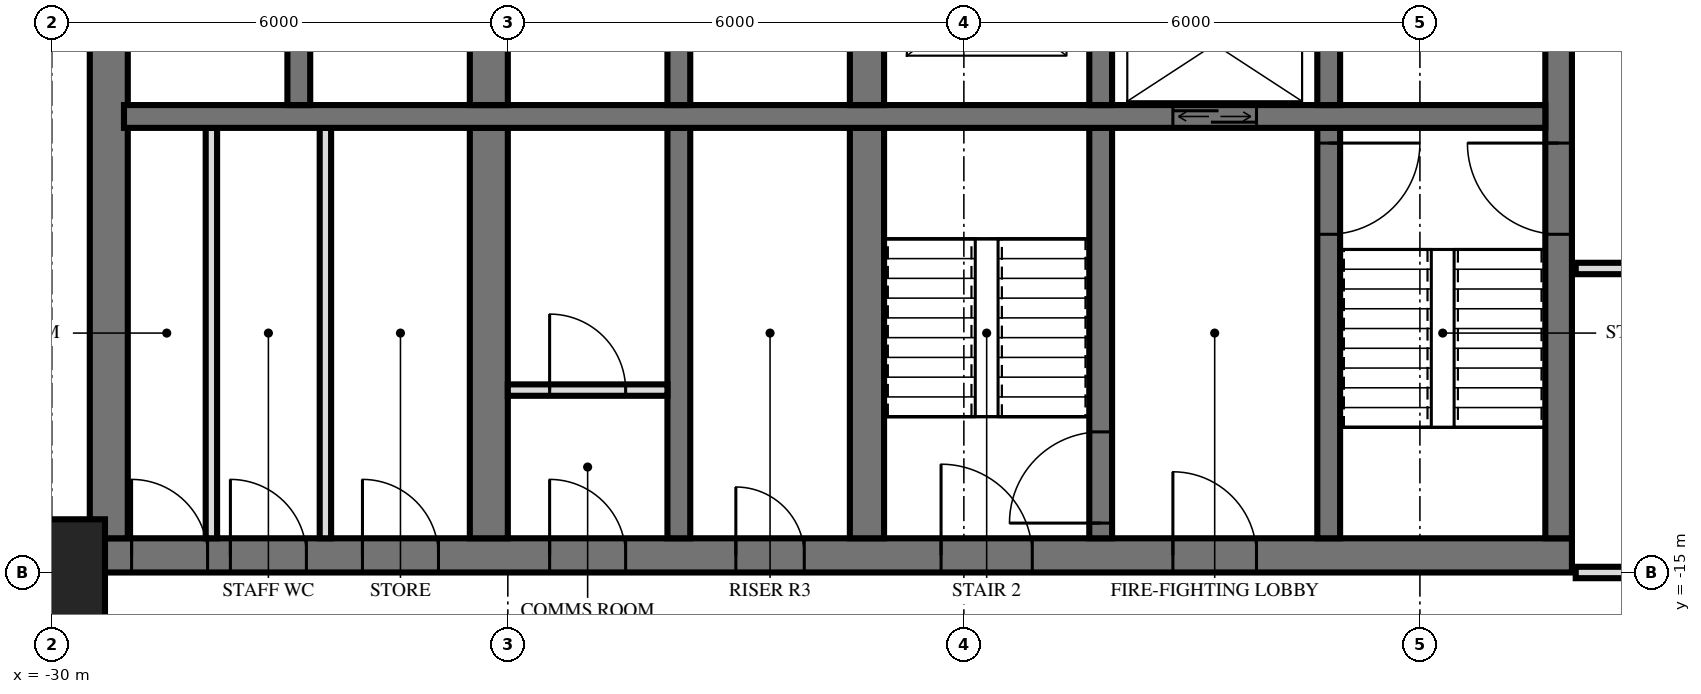
"""IFC4 building model, lengths in metres.
Left out: names, types, materials, properties, quantities, classifications, styles, units other than length and angle.
Written with IfcOpenShell. Run it as: python <this file> out.ifc"""

import sys

from ifc_helpers import new_model, si_unit, direction, frame, frame_2d, origin, origin_2d, place, context, subcontext, project, spatial, rectangle, extrude, element, fill, save


model = new_model("IFC4")
c1 = context("Model", 3, precision=1e-05, world=origin(), true_north=direction((0.0, 1.0)))
c2 = subcontext(c1, "Body", "Model", "MODEL_VIEW")
j1 = project(units=[si_unit("LENGTHUNIT", "METRE"), si_unit("PLANEANGLEUNIT", "RADIAN")], contexts=[c1])
p1 = place(None, origin())
s1 = spatial("IfcSite", under=j1, at=p1, CompositionType="ELEMENT")
p2 = place(p1, origin())
s2 = spatial("IfcBuilding", under=s1, at=p2, CompositionType="ELEMENT")
p3 = place(p2, frame((0.0, 0.0, 45.6)))
s3 = spatial("IfcBuildingStorey", under=s2, at=p3, CompositionType="ELEMENT", Elevation=45.6)
p4 = place(p3, frame((-30.0, -15.0, 0.0), z_axis=(0.0, 0.0, 1.0), x_axis=(1.0, 0.0, 0.0)))
e1 = element("IfcColumn", 1, at=p4, inside=s3, PredefinedType="COLUMN", context=c2, shape_type="SweptSolid", body=[
    extrude(rectangle(XDim=1.4, YDim=1.4, at=origin_2d()), origin(), (0.0, 0.0, 1.0), 3.6),
])
p5 = place(p3, frame((-29.5, -14.775, 0.0), z_axis=(0.0, 0.0, 1.0), x_axis=(1.0, 0.0, 0.0)))
e2 = element("IfcWall", 2, at=p5, inside=s3, PredefinedType="SHEAR", context=c2, shape_type="SweptSolid", body=[
    extrude(rectangle(XDim=19.5, YDim=0.45, at=frame_2d((9.75, 0.0))), origin(), (0.0, 0.0, 1.0), 3.6),
])
p6 = place(p5, frame((11.2, 0.0, 0.0)))
e3 = element("IfcOpeningElement", 3, at=p6, cuts=e2, PredefinedType="OPENING", context=c2, shape_type="SweptSolid", body=[
    extrude(rectangle(XDim=1.2, YDim=2.1, at=frame_2d((0.6, 1.05))), frame((0.0, 0.235, 0.0), z_axis=(0.0, -1.0, 0.0), x_axis=(1.0, 0.0, 0.0)), (0.0, 0.0, 1.0), 0.47),
])
p7 = place(p5, frame((14.25, 0.0, 0.0)))
e4 = element("IfcOpeningElement", 4, at=p7, cuts=e2, PredefinedType="OPENING", context=c2, shape_type="SweptSolid", body=[
    extrude(rectangle(XDim=1.1, YDim=2.1, at=frame_2d((0.55, 1.05))), frame((0.0, 0.235, 0.0), z_axis=(0.0, -1.0, 0.0), x_axis=(1.0, 0.0, 0.0)), (0.0, 0.0, 1.0), 0.47),
])
p8 = place(p5, frame((8.5, 0.0, 0.0)))
e5 = element("IfcOpeningElement", 5, at=p8, cuts=e2, PredefinedType="OPENING", context=c2, shape_type="SweptSolid", body=[
    extrude(rectangle(XDim=0.9, YDim=2.1, at=frame_2d((0.45, 1.05))), frame((0.0, 0.235, 0.0), z_axis=(0.0, -1.0, 0.0), x_axis=(1.0, 0.0, 0.0)), (0.0, 0.0, 1.0), 0.47),
])
p9 = place(p5, frame((6.05, 0.0, 0.0)))
e6 = element("IfcOpeningElement", 6, at=p9, cuts=e2, PredefinedType="OPENING", context=c2, shape_type="SweptSolid", body=[
    extrude(rectangle(XDim=1.0, YDim=2.1, at=frame_2d((0.5, 1.05))), frame((0.0, 0.235, 0.0), z_axis=(0.0, -1.0, 0.0), x_axis=(1.0, 0.0, 0.0)), (0.0, 0.0, 1.0), 0.47),
])
p10 = place(p5, frame((3.587, 0.0, 0.0)))
e7 = element("IfcOpeningElement", 7, at=p10, cuts=e2, PredefinedType="OPENING", context=c2, shape_type="SweptSolid", body=[
    extrude(rectangle(XDim=1.0, YDim=2.1, at=frame_2d((0.5, 1.05))), frame((0.0, 0.235, 0.0), z_axis=(0.0, -1.0, 0.0), x_axis=(1.0, 0.0, 0.0)), (0.0, 0.0, 1.0), 0.47),
])
p11 = place(p5, frame((1.85, 0.0, 0.0)))
e8 = element("IfcOpeningElement", 8, at=p11, cuts=e2, PredefinedType="OPENING", context=c2, shape_type="SweptSolid", body=[
    extrude(rectangle(XDim=1.0, YDim=2.1, at=frame_2d((0.5, 1.05))), frame((0.0, 0.235, 0.0), z_axis=(0.0, -1.0, 0.0), x_axis=(1.0, 0.0, 0.0)), (0.0, 0.0, 1.0), 0.47),
])
p12 = place(p5, frame((0.55, 0.0, 0.0)))
e9 = element("IfcOpeningElement", 9, at=p12, cuts=e2, PredefinedType="OPENING", context=c2, shape_type="SweptSolid", body=[
    extrude(rectangle(XDim=1.0, YDim=2.1, at=frame_2d((0.5, 1.05))), frame((0.0, 0.235, 0.0), z_axis=(0.0, -1.0, 0.0), x_axis=(1.0, 0.0, 0.0)), (0.0, 0.0, 1.0), 0.47),
])
p13 = place(p3, frame((-10.175, -14.55, 0.0), z_axis=(0.0, 0.0, 1.0), x_axis=(0.0, 1.0, 0.0)))
e10 = element("IfcWall", 10, at=p13, inside=s3, PredefinedType="SHEAR", context=c2, shape_type="SweptSolid", body=[
    extrude(rectangle(XDim=14.1, YDim=0.35, at=frame_2d((7.05, 0.0))), origin(), (0.0, 0.0, 1.0), 3.6),
])
p14 = place(p13, frame((8.4, 0.0, 0.0)))
e11 = element("IfcOpeningElement", 11, at=p14, cuts=e10, PredefinedType="OPENING", context=c2, shape_type="SweptSolid", body=[
    extrude(rectangle(XDim=1.4, YDim=2.4, at=frame_2d((0.7, 1.2))), frame((0.0, 0.185, 0.0), z_axis=(0.0, -1.0, 0.0), x_axis=(1.0, 0.0, 0.0)), (0.0, 0.0, 1.0), 0.37),
])
p15 = place(p13, frame((10.0, 0.0, 0.0)))
e12 = element("IfcOpeningElement", 12, at=p15, cuts=e10, PredefinedType="OPENING", context=c2, shape_type="SweptSolid", body=[
    extrude(rectangle(XDim=1.4, YDim=2.4, at=frame_2d((0.7, 1.2))), frame((0.0, 0.185, 0.0), z_axis=(0.0, -1.0, 0.0), x_axis=(1.0, 0.0, 0.0)), (0.0, 0.0, 1.0), 0.37),
])
p16 = place(p13, frame((4.0, 0.0, 0.0)))
e13 = element("IfcOpeningElement", 13, at=p16, cuts=e10, PredefinedType="OPENING", context=c2, shape_type="SweptSolid", body=[
    extrude(rectangle(XDim=1.2, YDim=2.1, at=frame_2d((0.6, 1.05))), frame((0.0, 0.185, 0.0), z_axis=(0.0, -1.0, 0.0), x_axis=(1.0, 0.0, 0.0)), (0.0, 0.0, 1.0), 0.37),
])
p17 = place(p3, frame((-29.25, -14.55, 0.0), z_axis=(0.0, 0.0, 1.0), x_axis=(0.0, 1.0, 0.0)))
e14 = element("IfcWall", 14, at=p17, inside=s3, PredefinedType="SHEAR", context=c2, shape_type="SweptSolid", body=[
    extrude(rectangle(XDim=14.1, YDim=0.5, at=frame_2d((7.05, 0.0))), origin(), (0.0, 0.0, 1.0), 3.6),
])
p18 = place(p3, frame((-29.05, -9.0, 0.0), z_axis=(0.0, 0.0, 1.0), x_axis=(1.0, 0.0, 0.0)))
e15 = element("IfcWall", 15, at=p18, inside=s3, PredefinedType="SHEAR", context=c2, shape_type="SweptSolid", body=[
    extrude(rectangle(XDim=18.7, YDim=0.3, at=frame_2d((9.35, 0.0))), origin(), (0.0, 0.0, 1.0), 3.6),
])
p19 = place(p18, frame((13.8, 0.0, 0.0)))
e16 = element("IfcOpeningElement", 16, at=p19, cuts=e15, PredefinedType="OPENING", context=c2, shape_type="SweptSolid", body=[
    extrude(rectangle(XDim=1.1, YDim=2.1, at=frame_2d((0.55, 1.05))), frame((0.0, 0.16, 0.0), z_axis=(0.0, -1.0, 0.0), x_axis=(1.0, 0.0, 0.0)), (0.0, 0.0, 1.0), 0.32),
])
p20 = place(p3, frame((-13.2, -8.85, 0.0), z_axis=(0.0, 0.0, 1.0), x_axis=(0.0, 1.0, 0.0)))
e17 = element("IfcWall", 17, at=p20, inside=s3, PredefinedType="SHEAR", context=c2, shape_type="SweptSolid", body=[
    extrude(rectangle(XDim=2.3, YDim=0.3, at=frame_2d((1.15, 0.0))), origin(), (0.0, 0.0, 1.0), 3.6),
])
p21 = place(p3, frame((-13.2, -14.55, 0.0), z_axis=(0.0, 0.0, 1.0), x_axis=(0.0, 1.0, 0.0)))
e18 = element("IfcWall", 18, at=p21, inside=s3, PredefinedType="SHEAR", context=c2, shape_type="SweptSolid", body=[
    extrude(rectangle(XDim=5.4, YDim=0.3, at=frame_2d((2.7, 0.0))), origin(), (0.0, 0.0, 1.0), 3.6),
])
p22 = place(p21, frame((4.0, 0.0, 0.0)))
e19 = element("IfcOpeningElement", 19, at=p22, cuts=e18, PredefinedType="OPENING", context=c2, shape_type="SweptSolid", body=[
    extrude(rectangle(XDim=1.2, YDim=2.1, at=frame_2d((0.6, 1.05))), frame((0.0, 0.16, 0.0), z_axis=(0.0, -1.0, 0.0), x_axis=(1.0, 0.0, 0.0)), (0.0, 0.0, 1.0), 0.32),
])
p23 = place(p3, frame((-16.2, -8.85, 0.0), z_axis=(0.0, 0.0, 1.0), x_axis=(0.0, 1.0, 0.0)))
e20 = element("IfcWall", 20, at=p23, inside=s3, PredefinedType="SHEAR", context=c2, shape_type="SweptSolid", body=[
    extrude(rectangle(XDim=2.3, YDim=0.3, at=frame_2d((1.15, 0.0))), origin(), (0.0, 0.0, 1.0), 3.6),
])
p24 = place(p3, frame((-16.2, -14.55, 0.0), z_axis=(0.0, 0.0, 1.0), x_axis=(0.0, 1.0, 0.0)))
e21 = element("IfcWall", 21, at=p24, inside=s3, PredefinedType="SHEAR", context=c2, shape_type="SweptSolid", body=[
    extrude(rectangle(XDim=5.4, YDim=0.3, at=frame_2d((2.7, 0.0))), origin(), (0.0, 0.0, 1.0), 3.6),
])
p25 = place(p24, frame((0.2, 0.0, 0.0)))
e22 = element("IfcOpeningElement", 22, at=p25, cuts=e21, PredefinedType="OPENING", context=c2, shape_type="SweptSolid", body=[
    extrude(rectangle(XDim=1.2, YDim=2.1, at=frame_2d((0.6, 1.05))), frame((0.0, 0.16, 0.0), z_axis=(0.0, -1.0, 0.0), x_axis=(1.0, 0.0, 0.0)), (0.0, 0.0, 1.0), 0.32),
])
p26 = place(p3, frame((-19.275, -8.85, 0.0), z_axis=(0.0, 0.0, 1.0), x_axis=(0.0, 1.0, 0.0)))
e23 = element("IfcWall", 23, at=p26, inside=s3, PredefinedType="SHEAR", context=c2, shape_type="SweptSolid", body=[
    extrude(rectangle(XDim=2.3, YDim=0.45, at=frame_2d((1.15, 0.0))), origin(), (0.0, 0.0, 1.0), 3.6),
])
p27 = place(p3, frame((-19.275, -14.55, 0.0), z_axis=(0.0, 0.0, 1.0), x_axis=(0.0, 1.0, 0.0)))
e24 = element("IfcWall", 24, at=p27, inside=s3, PredefinedType="SHEAR", context=c2, shape_type="SweptSolid", body=[
    extrude(rectangle(XDim=5.4, YDim=0.45, at=frame_2d((2.7, 0.0))), origin(), (0.0, 0.0, 1.0), 3.6),
])
p28 = place(p3, frame((-21.75, -8.85, 0.0), z_axis=(0.0, 0.0, 1.0), x_axis=(0.0, 1.0, 0.0)))
e25 = element("IfcWall", 25, at=p28, inside=s3, PredefinedType="SHEAR", context=c2, shape_type="SweptSolid", body=[
    extrude(rectangle(XDim=2.3, YDim=0.3, at=frame_2d((1.15, 0.0))), origin(), (0.0, 0.0, 1.0), 3.6),
])
p29 = place(p3, frame((-21.75, -14.55, 0.0), z_axis=(0.0, 0.0, 1.0), x_axis=(0.0, 1.0, 0.0)))
e26 = element("IfcWall", 26, at=p29, inside=s3, PredefinedType="SHEAR", context=c2, shape_type="SweptSolid", body=[
    extrude(rectangle(XDim=5.4, YDim=0.3, at=frame_2d((2.7, 0.0))), origin(), (0.0, 0.0, 1.0), 3.6),
])
p30 = place(p3, frame((-24.25, -8.85, 0.0), z_axis=(0.0, 0.0, 1.0), x_axis=(0.0, 1.0, 0.0)))
e27 = element("IfcWall", 27, at=p30, inside=s3, PredefinedType="SHEAR", context=c2, shape_type="SweptSolid", body=[
    extrude(rectangle(XDim=2.3, YDim=0.5, at=frame_2d((1.15, 0.0))), origin(), (0.0, 0.0, 1.0), 3.6),
])
p31 = place(p3, frame((-24.25, -14.55, 0.0), z_axis=(0.0, 0.0, 1.0), x_axis=(0.0, 1.0, 0.0)))
e28 = element("IfcWall", 28, at=p31, inside=s3, PredefinedType="SHEAR", context=c2, shape_type="SweptSolid", body=[
    extrude(rectangle(XDim=5.4, YDim=0.5, at=frame_2d((2.7, 0.0))), origin(), (0.0, 0.0, 1.0), 3.6),
])
p32 = place(p3, frame((-26.75, -8.85, 0.0), z_axis=(0.0, 0.0, 1.0), x_axis=(0.0, 1.0, 0.0)))
e29 = element("IfcWall", 29, at=p32, inside=s3, PredefinedType="SHEAR", context=c2, shape_type="SweptSolid", body=[
    extrude(rectangle(XDim=2.3, YDim=0.3, at=frame_2d((1.15, 0.0))), origin(), (0.0, 0.0, 1.0), 3.6),
])
p33 = place(p3, frame((-24.0, -12.6, 0.0), z_axis=(0.0, 0.0, 1.0), x_axis=(1.0, 0.0, 0.0)))
e30 = element("IfcWall", 30, at=p33, inside=s3, PredefinedType="PARTITIONING", context=c2, shape_type="SweptSolid", body=[
    extrude(rectangle(XDim=2.1, YDim=0.15, at=frame_2d((1.05, 0.0))), origin(), (0.0, 0.0, 1.0), 3.3),
])
p34 = place(p33, frame((0.55, 0.0, 0.0)))
e31 = element("IfcOpeningElement", 31, at=p34, cuts=e30, PredefinedType="OPENING", context=c2, shape_type="SweptSolid", body=[
    extrude(rectangle(XDim=1.0, YDim=2.1, at=frame_2d((0.5, 1.05))), frame((0.0, 0.085, 0.0), z_axis=(0.0, -1.0, 0.0), x_axis=(1.0, 0.0, 0.0)), (0.0, 0.0, 1.0), 0.17),
])
for number, where, z_axis, x_axis in (
    (32, (-26.4, -14.55, 0.0), (0.0, 0.0, 1.0), (0.0, 1.0, 0.0)),
    (33, (-27.9, -14.55, 0.0), (0.0, 0.0, 1.0), (0.0, 1.0, 0.0)),
):
    element("IfcWall", number, at=place(p3, frame(where, z_axis=z_axis, x_axis=x_axis)), inside=s3, PredefinedType="PARTITIONING", context=c2, shape_type="SweptSolid", body=[
        extrude(rectangle(XDim=5.4, YDim=0.15, at=frame_2d((2.7, 0.0))), origin(), (0.0, 0.0, 1.0), 3.3),
    ])
p35 = place(p3, frame((-33.12, -15.0, 0.0), z_axis=(0.0, 0.0, 1.0), x_axis=(1.0, 0.0, 0.0)))
e34 = element("IfcWall", 34, at=p35, inside=s3, PredefinedType="PARTITIONING", context=c2, shape_type="SweptSolid", body=[
    extrude(rectangle(XDim=3.57, YDim=0.15, at=frame_2d((1.785, 0.0))), origin(), (0.0, 0.0, 1.0), 3.32),
])
p36 = place(p35, frame((1.58, 0.0, 0.0)))
e35 = element("IfcOpeningElement", 35, at=p36, cuts=e34, PredefinedType="OPENING", context=c2, shape_type="SweptSolid", body=[
    extrude(rectangle(XDim=0.8, YDim=2.1, at=frame_2d((0.4, 1.05))), frame((0.0, 0.085, 0.0), z_axis=(0.0, -1.0, 0.0), x_axis=(1.0, 0.0, 0.0)), (0.0, 0.0, 1.0), 0.17),
])
p37 = place(p3, frame((-9.95, -15.0, 0.0), z_axis=(0.0, 0.0, 1.0), x_axis=(1.0, 0.0, 0.0)))
e36 = element("IfcWall", 36, at=p37, inside=s3, PredefinedType="PARTITIONING", context=c2, shape_type="SweptSolid", body=[
    extrude(rectangle(XDim=19.9, YDim=0.15, at=frame_2d((9.95, 0.0))), origin(), (0.0, 0.0, 1.0), 2.684),
])
p38 = place(p37, frame((9.45, 0.0, 0.0)))
e37 = element("IfcOpeningElement", 37, at=p38, cuts=e36, PredefinedType="OPENING", context=c2, shape_type="SweptSolid", body=[
    extrude(rectangle(XDim=1.0, YDim=2.1, at=frame_2d((0.5, 1.05))), frame((0.0, 0.085, 0.0), z_axis=(0.0, -1.0, 0.0), x_axis=(1.0, 0.0, 0.0)), (0.0, 0.0, 1.0), 0.17),
])
p39 = place(p3, frame((-9.95, -11.0, 0.0), z_axis=(0.0, 0.0, 1.0), x_axis=(1.0, 0.0, 0.0)))
e38 = element("IfcWall", 38, at=p39, inside=s3, PredefinedType="PARTITIONING", context=c2, shape_type="SweptSolid", body=[
    extrude(rectangle(XDim=19.9, YDim=0.15, at=frame_2d((9.95, 0.0))), origin(), (0.0, 0.0, 1.0), 3.32),
])
p40 = place(p39, frame((9.45, 0.0, 0.0)))
e39 = element("IfcOpeningElement", 39, at=p40, cuts=e38, PredefinedType="OPENING", context=c2, shape_type="SweptSolid", body=[
    extrude(rectangle(XDim=1.0, YDim=2.1, at=frame_2d((0.5, 1.05))), frame((0.0, 0.085, 0.0), z_axis=(0.0, -1.0, 0.0), x_axis=(1.0, 0.0, 0.0)), (0.0, 0.0, 1.0), 0.17),
])
p41 = place(p39, frame((15.45, 0.0, 0.0)))
e40 = element("IfcOpeningElement", 40, at=p41, cuts=e38, PredefinedType="OPENING", context=c2, shape_type="SweptSolid", body=[
    extrude(rectangle(XDim=1.0, YDim=2.1, at=frame_2d((0.5, 1.05))), frame((0.0, 0.085, 0.0), z_axis=(0.0, -1.0, 0.0), x_axis=(1.0, 0.0, 0.0)), (0.0, 0.0, 1.0), 0.17),
])
p42 = place(p19, origin())
e41 = element("IfcDoor", 41, at=p42, inside=s3, OperationType="DOUBLE_DOOR_SLIDING", PredefinedType="USERDEFINED", context=c2, shape_type="SweptSolid", body=[
    extrude(rectangle(XDim=1.1, YDim=2.1, at=frame_2d((0.55, 1.05))), frame((0.0, 0.025, 0.0), z_axis=(0.0, -1.0, 0.0), x_axis=(1.0, 0.0, 0.0)), (0.0, 0.0, 1.0), 0.05),
])
fill(e16, e41)
p43 = place(p16, origin())
e42 = element("IfcDoor", 42, at=p43, inside=s3, OperationType="SINGLE_SWING_LEFT", PredefinedType="DOOR", context=c2, shape_type="SweptSolid", body=[
    extrude(rectangle(XDim=1.2, YDim=2.1, at=frame_2d((0.6, 1.05))), frame((0.0, 0.025, 0.0), z_axis=(0.0, -1.0, 0.0), x_axis=(1.0, 0.0, 0.0)), (0.0, 0.0, 1.0), 0.05),
])
fill(e13, e42)
p44 = place(p6, origin())
e43 = element("IfcDoor", 43, at=p44, inside=s3, OperationType="SINGLE_SWING_RIGHT", PredefinedType="DOOR", context=c2, shape_type="SweptSolid", body=[
    extrude(rectangle(XDim=1.2, YDim=2.1, at=frame_2d((0.6, 1.05))), frame((0.0, 0.025, 0.0), z_axis=(0.0, -1.0, 0.0), x_axis=(1.0, 0.0, 0.0)), (0.0, 0.0, 1.0), 0.05),
])
fill(e3, e43)
p45 = place(p7, origin())
e44 = element("IfcDoor", 44, at=p45, inside=s3, OperationType="SINGLE_SWING_RIGHT", PredefinedType="DOOR", context=c2, shape_type="SweptSolid", body=[
    extrude(rectangle(XDim=1.1, YDim=2.1, at=frame_2d((0.55, 1.05))), frame((0.0, 0.025, 0.0), z_axis=(0.0, -1.0, 0.0), x_axis=(1.0, 0.0, 0.0)), (0.0, 0.0, 1.0), 0.05),
])
fill(e4, e44)
p46 = place(p8, origin())
e45 = element("IfcDoor", 45, at=p46, inside=s3, OperationType="SINGLE_SWING_RIGHT", PredefinedType="DOOR", context=c2, shape_type="SweptSolid", body=[
    extrude(rectangle(XDim=0.9, YDim=2.1, at=frame_2d((0.45, 1.05))), frame((0.0, 0.025, 0.0), z_axis=(0.0, -1.0, 0.0), x_axis=(1.0, 0.0, 0.0)), (0.0, 0.0, 1.0), 0.05),
])
fill(e5, e45)
p47 = place(p9, origin())
e46 = element("IfcDoor", 46, at=p47, inside=s3, OperationType="SINGLE_SWING_RIGHT", PredefinedType="DOOR", context=c2, shape_type="SweptSolid", body=[
    extrude(rectangle(XDim=1.0, YDim=2.1, at=frame_2d((0.5, 1.05))), frame((0.0, 0.025, 0.0), z_axis=(0.0, -1.0, 0.0), x_axis=(1.0, 0.0, 0.0)), (0.0, 0.0, 1.0), 0.05),
])
fill(e6, e46)
p48 = place(p10, origin())
e47 = element("IfcDoor", 47, at=p48, inside=s3, OperationType="SINGLE_SWING_RIGHT", PredefinedType="DOOR", context=c2, shape_type="SweptSolid", body=[
    extrude(rectangle(XDim=1.0, YDim=2.1, at=frame_2d((0.5, 1.05))), frame((0.0, 0.025, 0.0), z_axis=(0.0, -1.0, 0.0), x_axis=(1.0, 0.0, 0.0)), (0.0, 0.0, 1.0), 0.05),
])
fill(e7, e47)
p49 = place(p11, origin())
e48 = element("IfcDoor", 48, at=p49, inside=s3, OperationType="SINGLE_SWING_RIGHT", PredefinedType="DOOR", context=c2, shape_type="SweptSolid", body=[
    extrude(rectangle(XDim=1.0, YDim=2.1, at=frame_2d((0.5, 1.05))), frame((0.0, 0.025, 0.0), z_axis=(0.0, -1.0, 0.0), x_axis=(1.0, 0.0, 0.0)), (0.0, 0.0, 1.0), 0.05),
])
fill(e8, e48)
p50 = place(p12, origin())
e49 = element("IfcDoor", 49, at=p50, inside=s3, OperationType="SINGLE_SWING_RIGHT", PredefinedType="DOOR", context=c2, shape_type="SweptSolid", body=[
    extrude(rectangle(XDim=1.0, YDim=2.1, at=frame_2d((0.5, 1.05))), frame((0.0, 0.025, 0.0), z_axis=(0.0, -1.0, 0.0), x_axis=(1.0, 0.0, 0.0)), (0.0, 0.0, 1.0), 0.05),
])
fill(e9, e49)
p51 = place(p22, frame((0.6, 0.0, 0.0), z_axis=(0.0, 0.0, 1.0), x_axis=(-1.0, 0.0, 0.0)))
e50 = element("IfcDoor", 50, at=p51, inside=s3, OperationType="SINGLE_SWING_RIGHT", PredefinedType="DOOR", context=c2, shape_type="SweptSolid", body=[
    extrude(rectangle(XDim=1.2, YDim=2.1, at=frame_2d((0.0, 1.05))), frame((0.0, -0.025, 0.0), z_axis=(0.0, 1.0, 0.0), x_axis=(-1.0, 0.0, 0.0)), (0.0, 0.0, 1.0), 0.05),
])
fill(e19, e50)
p52 = place(p25, origin())
e51 = element("IfcDoor", 51, at=p52, inside=s3, OperationType="SINGLE_SWING_RIGHT", PredefinedType="DOOR", context=c2, shape_type="SweptSolid", body=[
    extrude(rectangle(XDim=1.2, YDim=2.1, at=frame_2d((0.6, 1.05))), frame((0.0, 0.025, 0.0), z_axis=(0.0, -1.0, 0.0), x_axis=(1.0, 0.0, 0.0)), (0.0, 0.0, 1.0), 0.05),
])
fill(e22, e51)
p53 = place(p34, origin())
e52 = element("IfcDoor", 52, at=p53, inside=s3, OperationType="SINGLE_SWING_RIGHT", PredefinedType="DOOR", context=c2, shape_type="SweptSolid", body=[
    extrude(rectangle(XDim=1.0, YDim=2.1, at=frame_2d((0.5, 1.05))), frame((0.0, 0.025, 0.0), z_axis=(0.0, -1.0, 0.0), x_axis=(1.0, 0.0, 0.0)), (0.0, 0.0, 1.0), 0.05),
])
fill(e31, e52)
save(model, sys.argv[1])
